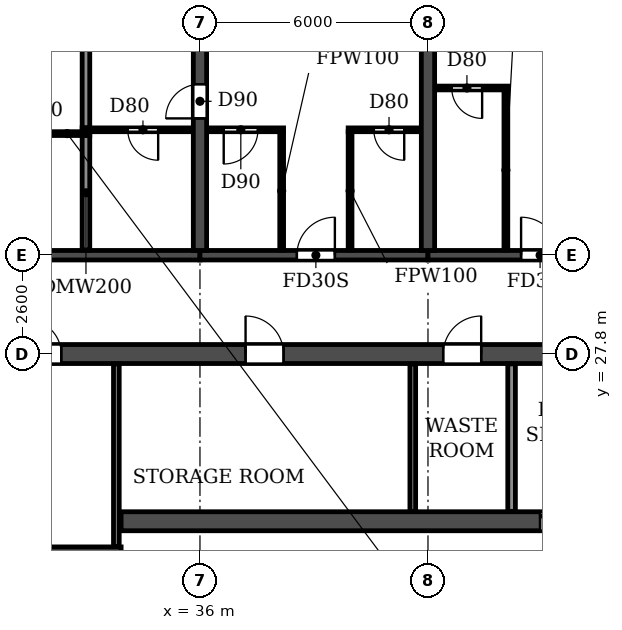
"""IFC4 building model, lengths in metres.
Left out: names, types, materials, properties, quantities, classifications, styles, units other than length and angle.
Written with IfcOpenShell. Run it as: python <this file> out.ifc"""

import sys

from ifc_helpers import new_model, si_unit, direction, frame, frame_2d, origin, place, context, subcontext, project, spatial, rectangle, extrude, element, fill, save


model = new_model("IFC4")
c1 = context("Model", 3, precision=1e-05, world=origin(), true_north=direction((0.0, 1.0)))
c2 = subcontext(c1, "Body", "Model", "MODEL_VIEW")
j1 = project(units=[si_unit("LENGTHUNIT", "METRE"), si_unit("PLANEANGLEUNIT", "RADIAN")], contexts=[c1])
p1 = place(None, origin())
s1 = spatial("IfcSite", under=j1, at=p1, CompositionType="ELEMENT")
p2 = place(p1, origin())
s2 = spatial("IfcBuilding", under=s1, at=p2, CompositionType="ELEMENT")
p3 = place(p2, frame((0.0, 0.0, 102.6)))
s3 = spatial("IfcBuildingStorey", under=s2, at=p3, CompositionType="ELEMENT", Elevation=102.6)
p4 = place(p3, frame((36.0, 30.525, 0.0), z_axis=(0.0, 0.0, 1.0), x_axis=(0.0, 1.0, 0.0)))
e1 = element("IfcWall", 1, at=p4, inside=s3, PredefinedType="SHEAR", context=c2, shape_type="SweptSolid", body=[
    extrude(rectangle(XDim=12.875, YDim=0.35, at=frame_2d((6.438, 0.0))), origin(), (0.0, 0.0, 1.0), 3.0),
])
p5 = place(p4, frame((3.475, 0.0, 0.0)))
e2 = element("IfcOpeningElement", 2, at=p5, cuts=e1, PredefinedType="OPENING", context=c2, shape_type="SweptSolid", body=[
    extrude(rectangle(XDim=0.9, YDim=2.1, at=frame_2d((0.45, 1.05))), frame((0.0, 0.185, 0.0), z_axis=(0.0, -1.0, 0.0), x_axis=(1.0, 0.0, 0.0)), (0.0, 0.0, 1.0), 0.37),
])
p6 = place(p3, frame((42.0, 30.525, 0.0), z_axis=(0.0, 0.0, 1.0), x_axis=(0.0, 1.0, 0.0)))
e3 = element("IfcWall", 3, at=p6, inside=s3, PredefinedType="SHEAR", context=c2, shape_type="SweptSolid", body=[
    extrude(rectangle(XDim=12.875, YDim=0.35, at=frame_2d((6.438, 0.0))), origin(), (0.0, 0.0, 1.0), 3.0),
])
p7 = place(p3, frame((30.0, 30.4, 0.0), z_axis=(0.0, 0.0, 1.0), x_axis=(1.0, 0.0, 0.0)))
e4 = element("IfcWall", 4, at=p7, inside=s3, PredefinedType="SHEAR", context=c2, shape_type="SweptSolid", body=[
    extrude(rectangle(XDim=6.0, YDim=0.25, at=frame_2d((3.0, 0.0))), origin(), (0.0, 0.0, 1.0), 2.4),
])
p8 = place(p3, frame((36.0, 30.4, 0.0), z_axis=(0.0, 0.0, 1.0), x_axis=(1.0, 0.0, 0.0)))
e5 = element("IfcWall", 5, at=p8, inside=s3, PredefinedType="SHEAR", context=c2, shape_type="SweptSolid", body=[
    extrude(rectangle(XDim=6.0, YDim=0.25, at=frame_2d((3.0, 0.0))), origin(), (0.0, 0.0, 1.0), 2.4),
])
p9 = place(p8, frame((2.55, 0.0, 0.0)))
e6 = element("IfcOpeningElement", 6, at=p9, cuts=e5, PredefinedType="OPENING", context=c2, shape_type="SweptSolid", body=[
    extrude(rectangle(XDim=1.0, YDim=2.1, at=frame_2d((0.5, 1.05))), frame((0.0, 0.135, 0.0), z_axis=(0.0, -1.0, 0.0), x_axis=(1.0, 0.0, 0.0)), (0.0, 0.0, 1.0), 0.27),
])
p10 = place(p3, frame((42.0, 30.4, 0.0), z_axis=(0.0, 0.0, 1.0), x_axis=(1.0, 0.0, 0.0)))
e7 = element("IfcWall", 7, at=p10, inside=s3, PredefinedType="SHEAR", context=c2, shape_type="SweptSolid", body=[
    extrude(rectangle(XDim=6.0, YDim=0.25, at=frame_2d((3.0, 0.0))), origin(), (0.0, 0.0, 1.0), 2.4),
])
p11 = place(p10, frame((2.45, 0.0, 0.0)))
e8 = element("IfcOpeningElement", 8, at=p11, cuts=e7, PredefinedType="OPENING", context=c2, shape_type="SweptSolid", body=[
    extrude(rectangle(XDim=1.0, YDim=2.1, at=frame_2d((0.5, 1.05))), frame((0.0, 0.135, 0.0), z_axis=(0.0, -1.0, 0.0), x_axis=(1.0, 0.0, 0.0)), (0.0, 0.0, 1.0), 0.27),
])
p12 = place(p3, frame((8.6, 27.8, 0.0), z_axis=(0.0, 0.0, 1.0), x_axis=(1.0, 0.0, 0.0)))
e9 = element("IfcWall", 9, at=p12, inside=s3, PredefinedType="SOLIDWALL", context=c2, shape_type="SweptSolid", body=[
    extrude(rectangle(XDim=84.8, YDim=0.5, at=frame_2d((42.4, 0.0))), origin(), (0.0, 0.0, 1.0), 3.0),
])
p13 = place(p12, frame((1.35, 0.0, 0.0)))
e10 = element("IfcOpeningElement", 10, at=p13, cuts=e9, PredefinedType="OPENING", context=c2, shape_type="SweptSolid", body=[
    extrude(rectangle(XDim=1.0, YDim=2.1, at=frame_2d((0.5, 1.05))), frame((0.0, 0.26, 0.0), z_axis=(0.0, -1.0, 0.0), x_axis=(1.0, 0.0, 0.0)), (0.0, 0.0, 1.0), 0.52),
])
p14 = place(p12, frame((6.05, 0.0, 0.0)))
e11 = element("IfcOpeningElement", 11, at=p14, cuts=e9, PredefinedType="OPENING", context=c2, shape_type="SweptSolid", body=[
    extrude(rectangle(XDim=1.0, YDim=2.1, at=frame_2d((0.5, 1.05))), frame((0.0, 0.26, 0.0), z_axis=(0.0, -1.0, 0.0), x_axis=(1.0, 0.0, 0.0)), (0.0, 0.0, 1.0), 0.52),
])
p15 = place(p12, frame((10.3, 0.0, 0.0)))
e12 = element("IfcOpeningElement", 12, at=p15, cuts=e9, PredefinedType="OPENING", context=c2, shape_type="SweptSolid", body=[
    extrude(rectangle(XDim=1.0, YDim=2.1, at=frame_2d((0.5, 1.05))), frame((0.0, 0.26, 0.0), z_axis=(0.0, -1.0, 0.0), x_axis=(1.0, 0.0, 0.0)), (0.0, 0.0, 1.0), 0.52),
])
p16 = place(p12, frame((13.65, 0.0, 0.0)))
e13 = element("IfcOpeningElement", 13, at=p16, cuts=e9, PredefinedType="OPENING", context=c2, shape_type="SweptSolid", body=[
    extrude(rectangle(XDim=0.9, YDim=2.1, at=frame_2d((0.45, 1.05))), frame((0.0, 0.26, 0.0), z_axis=(0.0, -1.0, 0.0), x_axis=(1.0, 0.0, 0.0)), (0.0, 0.0, 1.0), 0.52),
])
p17 = place(p12, frame((22.85, 0.0, 0.0)))
e14 = element("IfcOpeningElement", 14, at=p17, cuts=e9, PredefinedType="OPENING", context=c2, shape_type="SweptSolid", body=[
    extrude(rectangle(XDim=0.9, YDim=2.1, at=frame_2d((0.45, 1.05))), frame((0.0, 0.26, 0.0), z_axis=(0.0, -1.0, 0.0), x_axis=(1.0, 0.0, 0.0)), (0.0, 0.0, 1.0), 0.52),
])
p18 = place(p12, frame((28.6, 0.0, 0.0)))
e15 = element("IfcOpeningElement", 15, at=p18, cuts=e9, PredefinedType="OPENING", context=c2, shape_type="SweptSolid", body=[
    extrude(rectangle(XDim=1.0, YDim=2.1, at=frame_2d((0.5, 1.05))), frame((0.0, 0.26, 0.0), z_axis=(0.0, -1.0, 0.0), x_axis=(1.0, 0.0, 0.0)), (0.0, 0.0, 1.0), 0.52),
])
p19 = place(p12, frame((33.8, 0.0, 0.0)))
e16 = element("IfcOpeningElement", 16, at=p19, cuts=e9, PredefinedType="OPENING", context=c2, shape_type="SweptSolid", body=[
    extrude(rectangle(XDim=1.0, YDim=2.1, at=frame_2d((0.5, 1.05))), frame((0.0, 0.26, 0.0), z_axis=(0.0, -1.0, 0.0), x_axis=(1.0, 0.0, 0.0)), (0.0, 0.0, 1.0), 0.52),
])
p20 = place(p12, frame((39.0, 0.0, 0.0)))
e17 = element("IfcOpeningElement", 17, at=p20, cuts=e9, PredefinedType="OPENING", context=c2, shape_type="SweptSolid", body=[
    extrude(rectangle(XDim=1.0, YDim=2.1, at=frame_2d((0.5, 1.05))), frame((0.0, 0.26, 0.0), z_axis=(0.0, -1.0, 0.0), x_axis=(1.0, 0.0, 0.0)), (0.0, 0.0, 1.0), 0.52),
])
p21 = place(p12, frame((41.9, 0.0, 0.0)))
e18 = element("IfcOpeningElement", 18, at=p21, cuts=e9, PredefinedType="OPENING", context=c2, shape_type="SweptSolid", body=[
    extrude(rectangle(XDim=1.0, YDim=2.1, at=frame_2d((0.5, 1.05))), frame((0.0, 0.26, 0.0), z_axis=(0.0, -1.0, 0.0), x_axis=(1.0, 0.0, 0.0)), (0.0, 0.0, 1.0), 0.52),
])
p22 = place(p12, frame((44.8, 0.0, 0.0)))
e19 = element("IfcOpeningElement", 19, at=p22, cuts=e9, PredefinedType="OPENING", context=c2, shape_type="SweptSolid", body=[
    extrude(rectangle(XDim=1.0, YDim=2.1, at=frame_2d((0.5, 1.05))), frame((0.0, 0.26, 0.0), z_axis=(0.0, -1.0, 0.0), x_axis=(1.0, 0.0, 0.0)), (0.0, 0.0, 1.0), 0.52),
])
p23 = place(p12, frame((48.7, 0.0, 0.0)))
e20 = element("IfcOpeningElement", 20, at=p23, cuts=e9, PredefinedType="OPENING", context=c2, shape_type="SweptSolid", body=[
    extrude(rectangle(XDim=1.0, YDim=2.1, at=frame_2d((0.5, 1.05))), frame((0.0, 0.26, 0.0), z_axis=(0.0, -1.0, 0.0), x_axis=(1.0, 0.0, 0.0)), (0.0, 0.0, 1.0), 0.52),
])
p24 = place(p12, frame((55.2, 0.0, 0.0)))
e21 = element("IfcOpeningElement", 21, at=p24, cuts=e9, PredefinedType="OPENING", context=c2, shape_type="SweptSolid", body=[
    extrude(rectangle(XDim=1.0, YDim=2.1, at=frame_2d((0.5, 1.05))), frame((0.0, 0.26, 0.0), z_axis=(0.0, -1.0, 0.0), x_axis=(1.0, 0.0, 0.0)), (0.0, 0.0, 1.0), 0.52),
])
p25 = place(p12, frame((61.05, 0.0, 0.0)))
e22 = element("IfcOpeningElement", 22, at=p25, cuts=e9, PredefinedType="OPENING", context=c2, shape_type="SweptSolid", body=[
    extrude(rectangle(XDim=0.9, YDim=2.1, at=frame_2d((0.45, 1.05))), frame((0.0, 0.26, 0.0), z_axis=(0.0, -1.0, 0.0), x_axis=(1.0, 0.0, 0.0)), (0.0, 0.0, 1.0), 0.52),
])
p26 = place(p12, frame((70.25, 0.0, 0.0)))
e23 = element("IfcOpeningElement", 23, at=p26, cuts=e9, PredefinedType="OPENING", context=c2, shape_type="SweptSolid", body=[
    extrude(rectangle(XDim=0.9, YDim=2.1, at=frame_2d((0.45, 1.05))), frame((0.0, 0.26, 0.0), z_axis=(0.0, -1.0, 0.0), x_axis=(1.0, 0.0, 0.0)), (0.0, 0.0, 1.0), 0.52),
])
p27 = place(p12, frame((73.5, 0.0, 0.0)))
e24 = element("IfcOpeningElement", 24, at=p27, cuts=e9, PredefinedType="OPENING", context=c2, shape_type="SweptSolid", body=[
    extrude(rectangle(XDim=1.0, YDim=2.1, at=frame_2d((0.5, 1.05))), frame((0.0, 0.26, 0.0), z_axis=(0.0, -1.0, 0.0), x_axis=(1.0, 0.0, 0.0)), (0.0, 0.0, 1.0), 0.52),
])
p28 = place(p12, frame((77.95, 0.0, 0.0)))
e25 = element("IfcOpeningElement", 25, at=p28, cuts=e9, PredefinedType="OPENING", context=c2, shape_type="SweptSolid", body=[
    extrude(rectangle(XDim=1.5, YDim=2.1, at=frame_2d((0.75, 1.05))), frame((0.0, 0.26, 0.0), z_axis=(0.0, -1.0, 0.0), x_axis=(1.0, 0.0, 0.0)), (0.0, 0.0, 1.0), 0.52),
])
p29 = place(p12, frame((82.9, 0.0, 0.0)))
e26 = element("IfcOpeningElement", 26, at=p29, cuts=e9, PredefinedType="OPENING", context=c2, shape_type="SweptSolid", body=[
    extrude(rectangle(XDim=1.0, YDim=2.1, at=frame_2d((0.5, 1.05))), frame((0.0, 0.26, 0.0), z_axis=(0.0, -1.0, 0.0), x_axis=(1.0, 0.0, 0.0)), (0.0, 0.0, 1.0), 0.52),
])
p30 = place(p3, frame((33.925, 23.4, 0.0), z_axis=(0.0, 0.0, 1.0), x_axis=(1.0, 0.0, 0.0)))
e27 = element("IfcWall", 27, at=p30, inside=s3, PredefinedType="SOLIDWALL", context=c2, shape_type="SweptSolid", body=[
    extrude(rectangle(XDim=34.15, YDim=0.5, at=frame_2d((17.075, 0.0))), origin(), (0.0, 0.0, 1.0), 3.0),
])
p31 = place(p30, frame((16.175, 0.0, 0.0)))
e28 = element("IfcOpeningElement", 28, at=p31, cuts=e27, PredefinedType="OPENING", context=c2, shape_type="SweptSolid", body=[
    extrude(rectangle(XDim=1.8, YDim=2.1, at=frame_2d((0.9, 1.05))), frame((0.0, 0.26, 0.0), z_axis=(0.0, -1.0, 0.0), x_axis=(1.0, 0.0, 0.0)), (0.0, 0.0, 1.0), 0.52),
])
p32 = place(p30, frame((11.025, 0.0, 0.0)))
e29 = element("IfcOpeningElement", 29, at=p32, cuts=e27, PredefinedType="OPENING", context=c2, shape_type="SweptSolid", body=[
    extrude(rectangle(XDim=1.1, YDim=2.1, at=frame_2d((0.55, 1.05))), frame((0.0, 0.26, 0.0), z_axis=(0.0, -1.0, 0.0), x_axis=(1.0, 0.0, 0.0)), (0.0, 0.0, 1.0), 0.52),
])
p33 = place(p3, frame((29.875, 22.6, 0.0), z_axis=(0.0, 0.0, 1.0), x_axis=(1.0, 0.0, 0.0)))
e30 = element("IfcWall", 30, at=p33, inside=s3, PredefinedType="SOLIDWALL", context=c2, shape_type="SweptSolid", body=[
    extrude(rectangle(XDim=4.05, YDim=0.25, at=frame_2d((2.025, 0.0))), origin(), (0.0, 0.0, 1.0), 3.0),
])
p34 = place(p3, frame((33.0, 30.535, 0.0), z_axis=(0.0, 0.0, 1.0), x_axis=(0.0, 1.0, 0.0)))
e31 = element("IfcWall", 31, at=p34, inside=s3, PredefinedType="PARTITIONING", context=c2, shape_type="SweptSolid", body=[
    extrude(rectangle(XDim=3.015, YDim=0.2, at=frame_2d((1.508, 0.0))), origin(), (0.0, 0.0, 1.0), 3.0),
])
p35 = place(p3, frame((33.0, 33.75, 0.0), z_axis=(0.0, 0.0, 1.0), x_axis=(0.0, 1.0, 0.0)))
e32 = element("IfcWall", 32, at=p35, inside=s3, PredefinedType="PARTITIONING", context=c2, shape_type="SweptSolid", body=[
    extrude(rectangle(XDim=9.79, YDim=0.2, at=frame_2d((4.895, 0.0))), origin(), (0.0, 0.0, 1.0), 3.0),
])
p36 = place(p3, frame((30.185, 33.6, 0.0), z_axis=(0.0, 0.0, 1.0), x_axis=(1.0, 0.0, 0.0)))
e33 = element("IfcWall", 33, at=p36, inside=s3, PredefinedType="PARTITIONING", context=c2, shape_type="SweptSolid", body=[
    extrude(rectangle(XDim=2.915, YDim=0.1, at=frame_2d((1.458, 0.0))), origin(), (0.0, 0.0, 1.0), 3.0),
])
p37 = place(p36, frame((0.915, 0.0, 0.0)))
e34 = element("IfcOpeningElement", 34, at=p37, cuts=e33, PredefinedType="OPENING", context=c2, shape_type="SweptSolid", body=[
    extrude(rectangle(XDim=0.8, YDim=2.1, at=frame_2d((0.4, 1.05))), frame((0.0, 0.06, 0.0), z_axis=(0.0, -1.0, 0.0), x_axis=(1.0, 0.0, 0.0)), (0.0, 0.0, 1.0), 0.12),
])
p38 = place(p3, frame((32.9, 33.7, 0.0), z_axis=(0.0, 0.0, 1.0), x_axis=(1.0, 0.0, 0.0)))
e35 = element("IfcWall", 35, at=p38, inside=s3, PredefinedType="PARTITIONING", context=c2, shape_type="SweptSolid", body=[
    extrude(rectangle(XDim=2.915, YDim=0.1, at=frame_2d((1.458, 0.0))), origin(), (0.0, 0.0, 1.0), 3.0),
])
p39 = place(p38, frame((1.2, 0.0, 0.0)))
e36 = element("IfcOpeningElement", 36, at=p39, cuts=e35, PredefinedType="OPENING", context=c2, shape_type="SweptSolid", body=[
    extrude(rectangle(XDim=0.8, YDim=2.1, at=frame_2d((0.4, 1.05))), frame((0.0, 0.06, 0.0), z_axis=(0.0, -1.0, 0.0), x_axis=(1.0, 0.0, 0.0)), (0.0, 0.0, 1.0), 0.12),
])
p40 = place(p3, frame((36.185, 33.7, 0.0), z_axis=(0.0, 0.0, 1.0), x_axis=(1.0, 0.0, 0.0)))
e37 = element("IfcWall", 37, at=p40, inside=s3, PredefinedType="PARTITIONING", context=c2, shape_type="SweptSolid", body=[
    extrude(rectangle(XDim=2.015, YDim=0.1, at=frame_2d((1.007, 0.0))), origin(), (0.0, 0.0, 1.0), 3.0),
])
p41 = place(p40, frame((0.44, 0.0, 0.0)))
e38 = element("IfcOpeningElement", 38, at=p41, cuts=e37, PredefinedType="OPENING", context=c2, shape_type="SweptSolid", body=[
    extrude(rectangle(XDim=0.9, YDim=2.1, at=frame_2d((0.45, 1.05))), frame((0.0, 0.06, 0.0), z_axis=(0.0, -1.0, 0.0), x_axis=(1.0, 0.0, 0.0)), (0.0, 0.0, 1.0), 0.12),
])
p42 = place(p3, frame((39.9, 33.7, 0.0), z_axis=(0.0, 0.0, 1.0), x_axis=(1.0, 0.0, 0.0)))
e39 = element("IfcWall", 39, at=p42, inside=s3, PredefinedType="PARTITIONING", context=c2, shape_type="SweptSolid", body=[
    extrude(rectangle(XDim=1.915, YDim=0.1, at=frame_2d((0.958, 0.0))), origin(), (0.0, 0.0, 1.0), 3.0),
])
p43 = place(p42, frame((0.675, 0.0, 0.0)))
e40 = element("IfcOpeningElement", 40, at=p43, cuts=e39, PredefinedType="OPENING", context=c2, shape_type="SweptSolid", body=[
    extrude(rectangle(XDim=0.8, YDim=2.1, at=frame_2d((0.4, 1.05))), frame((0.0, 0.06, 0.0), z_axis=(0.0, -1.0, 0.0), x_axis=(1.0, 0.0, 0.0)), (0.0, 0.0, 1.0), 0.12),
])
p44 = place(p3, frame((42.185, 34.8, 0.0), z_axis=(0.0, 0.0, 1.0), x_axis=(1.0, 0.0, 0.0)))
e41 = element("IfcWall", 41, at=p44, inside=s3, PredefinedType="PARTITIONING", context=c2, shape_type="SweptSolid", body=[
    extrude(rectangle(XDim=1.915, YDim=0.1, at=frame_2d((0.958, 0.0))), origin(), (0.0, 0.0, 1.0), 3.0),
])
p45 = place(p44, frame((0.44, 0.0, 0.0)))
e42 = element("IfcOpeningElement", 42, at=p45, cuts=e41, PredefinedType="OPENING", context=c2, shape_type="SweptSolid", body=[
    extrude(rectangle(XDim=0.8, YDim=2.1, at=frame_2d((0.4, 1.05))), frame((0.0, 0.06, 0.0), z_axis=(0.0, -1.0, 0.0), x_axis=(1.0, 0.0, 0.0)), (0.0, 0.0, 1.0), 0.12),
])
for number, where, z_axis, x_axis in (
    (43, (38.15, 30.535, 0.0), (0.0, 0.0, 1.0), (0.0, 1.0, 0.0)),
    (44, (39.95, 30.535, 0.0), (0.0, 0.0, 1.0), (0.0, 1.0, 0.0)),
):
    element("IfcWall", number, at=place(p3, frame(where, z_axis=z_axis, x_axis=x_axis)), inside=s3, PredefinedType="PARTITIONING", context=c2, shape_type="SweptSolid", body=[
        extrude(rectangle(XDim=3.115, YDim=0.1, at=frame_2d((1.558, 0.0))), origin(), (0.0, 0.0, 1.0), 3.0),
    ])
p46 = place(p3, frame((44.05, 30.535, 0.0), z_axis=(0.0, 0.0, 1.0), x_axis=(0.0, 1.0, 0.0)))
e45 = element("IfcWall", 45, at=p46, inside=s3, PredefinedType="PARTITIONING", context=c2, shape_type="SweptSolid", body=[
    extrude(rectangle(XDim=4.215, YDim=0.1, at=frame_2d((2.107, 0.0))), origin(), (0.0, 0.0, 1.0), 3.0),
])
p47 = place(p3, frame((41.6, 23.66, 0.0), z_axis=(0.0, 0.0, 1.0), x_axis=(0.0, 1.0, 0.0)))
e46 = element("IfcWall", 46, at=p47, inside=s3, PredefinedType="PARTITIONING", context=c2, shape_type="SweptSolid", body=[
    extrude(rectangle(XDim=3.88, YDim=0.15, at=frame_2d((1.94, 0.0))), origin(), (0.0, 0.0, 1.0), 3.0),
])
p48 = place(p3, frame((33.8, 22.735, 0.0), z_axis=(0.0, 0.0, 1.0), x_axis=(0.0, 1.0, 0.0)))
e47 = element("IfcWall", 47, at=p48, inside=s3, PredefinedType="PARTITIONING", context=c2, shape_type="SweptSolid", body=[
    extrude(rectangle(XDim=4.805, YDim=0.15, at=frame_2d((2.402, 0.0))), origin(), (0.0, 0.0, 1.0), 3.0),
])
p49 = place(p3, frame((44.2, 23.66, 0.0), z_axis=(0.0, 0.0, 1.0), x_axis=(0.0, 1.0, 0.0)))
e48 = element("IfcWall", 48, at=p49, inside=s3, PredefinedType="PARTITIONING", context=c2, shape_type="SweptSolid", body=[
    extrude(rectangle(XDim=3.88, YDim=0.2, at=frame_2d((1.94, 0.0))), origin(), (0.0, 0.0, 1.0), 3.0),
])
p50 = place(p17, origin())
e49 = element("IfcDoor", 49, at=p50, inside=s3, OperationType="SINGLE_SWING_LEFT", PredefinedType="DOOR", context=c2, shape_type="SweptSolid", body=[
    extrude(rectangle(XDim=0.9, YDim=2.1, at=frame_2d((0.45, 1.05))), frame((0.0, 0.025, 0.0), z_axis=(0.0, -1.0, 0.0), x_axis=(1.0, 0.0, 0.0)), (0.0, 0.0, 1.0), 0.05),
])
fill(e14, e49)
p51 = place(p18, origin())
e50 = element("IfcDoor", 50, at=p51, inside=s3, OperationType="SINGLE_SWING_LEFT", PredefinedType="DOOR", context=c2, shape_type="SweptSolid", body=[
    extrude(rectangle(XDim=1.0, YDim=2.1, at=frame_2d((0.5, 1.05))), frame((0.0, 0.025, 0.0), z_axis=(0.0, -1.0, 0.0), x_axis=(1.0, 0.0, 0.0)), (0.0, 0.0, 1.0), 0.05),
])
fill(e15, e50)
p52 = place(p19, origin())
e51 = element("IfcDoor", 51, at=p52, inside=s3, OperationType="SINGLE_SWING_RIGHT", PredefinedType="DOOR", context=c2, shape_type="SweptSolid", body=[
    extrude(rectangle(XDim=1.0, YDim=2.1, at=frame_2d((0.5, 1.05))), frame((0.0, 0.025, 0.0), z_axis=(0.0, -1.0, 0.0), x_axis=(1.0, 0.0, 0.0)), (0.0, 0.0, 1.0), 0.05),
])
fill(e16, e51)
p53 = place(p39, frame((0.8, 0.0, 0.0), z_axis=(0.0, 0.0, 1.0), x_axis=(-1.0, 0.0, 0.0)))
e52 = element("IfcDoor", 52, at=p53, inside=s3, OperationType="SINGLE_SWING_LEFT", PredefinedType="DOOR", context=c2, shape_type="SweptSolid", body=[
    extrude(rectangle(XDim=0.8, YDim=2.1, at=frame_2d((0.4, 1.05))), frame((0.0, 0.025, 0.0), z_axis=(0.0, -1.0, 0.0), x_axis=(1.0, 0.0, 0.0)), (0.0, 0.0, 1.0), 0.05),
])
fill(e36, e52)
p54 = place(p5, origin())
e53 = element("IfcDoor", 53, at=p54, inside=s3, OperationType="SINGLE_SWING_LEFT", PredefinedType="DOOR", context=c2, shape_type="SweptSolid", body=[
    extrude(rectangle(XDim=0.9, YDim=2.1, at=frame_2d((0.45, 1.05))), frame((0.0, 0.025, 0.0), z_axis=(0.0, -1.0, 0.0), x_axis=(1.0, 0.0, 0.0)), (0.0, 0.0, 1.0), 0.05),
])
fill(e2, e53)
p55 = place(p41, frame((0.9, 0.0, 0.0), z_axis=(0.0, 0.0, 1.0), x_axis=(-1.0, 0.0, 0.0)))
e54 = element("IfcDoor", 54, at=p55, inside=s3, OperationType="SINGLE_SWING_RIGHT", PredefinedType="DOOR", context=c2, shape_type="SweptSolid", body=[
    extrude(rectangle(XDim=0.9, YDim=2.1, at=frame_2d((0.45, 1.05))), frame((0.0, 0.025, 0.0), z_axis=(0.0, -1.0, 0.0), x_axis=(1.0, 0.0, 0.0)), (0.0, 0.0, 1.0), 0.05),
])
fill(e38, e54)
p56 = place(p9, origin())
e55 = element("IfcDoor", 55, at=p56, inside=s3, OperationType="SINGLE_SWING_RIGHT", PredefinedType="DOOR", context=c2, shape_type="SweptSolid", body=[
    extrude(rectangle(XDim=1.0, YDim=2.1, at=frame_2d((0.5, 1.05))), frame((0.0, 0.025, 0.0), z_axis=(0.0, -1.0, 0.0), x_axis=(1.0, 0.0, 0.0)), (0.0, 0.0, 1.0), 0.05),
])
fill(e6, e55)
p57 = place(p43, frame((0.8, 0.0, 0.0), z_axis=(0.0, 0.0, 1.0), x_axis=(-1.0, 0.0, 0.0)))
e56 = element("IfcDoor", 56, at=p57, inside=s3, OperationType="SINGLE_SWING_LEFT", PredefinedType="DOOR", context=c2, shape_type="SweptSolid", body=[
    extrude(rectangle(XDim=0.8, YDim=2.1, at=frame_2d((0.4, 1.05))), frame((0.0, 0.025, 0.0), z_axis=(0.0, -1.0, 0.0), x_axis=(1.0, 0.0, 0.0)), (0.0, 0.0, 1.0), 0.05),
])
fill(e40, e56)
p58 = place(p45, frame((0.8, 0.0, 0.0), z_axis=(0.0, 0.0, 1.0), x_axis=(-1.0, 0.0, 0.0)))
e57 = element("IfcDoor", 57, at=p58, inside=s3, OperationType="SINGLE_SWING_LEFT", PredefinedType="DOOR", context=c2, shape_type="SweptSolid", body=[
    extrude(rectangle(XDim=0.8, YDim=2.1, at=frame_2d((0.4, 1.05))), frame((0.0, 0.025, 0.0), z_axis=(0.0, -1.0, 0.0), x_axis=(1.0, 0.0, 0.0)), (0.0, 0.0, 1.0), 0.05),
])
fill(e42, e57)
p59 = place(p11, origin())
e58 = element("IfcDoor", 58, at=p59, inside=s3, OperationType="SINGLE_SWING_LEFT", PredefinedType="DOOR", context=c2, shape_type="SweptSolid", body=[
    extrude(rectangle(XDim=1.0, YDim=2.1, at=frame_2d((0.5, 1.05))), frame((0.0, 0.025, 0.0), z_axis=(0.0, -1.0, 0.0), x_axis=(1.0, 0.0, 0.0)), (0.0, 0.0, 1.0), 0.05),
])
fill(e8, e58)
p60 = place(p32, origin())
e59 = element("IfcDoor", 59, at=p60, inside=s3, OperationType="DOUBLE_DOOR_SLIDING", PredefinedType="DOOR", context=c2, shape_type="SweptSolid", body=[
    extrude(rectangle(XDim=1.1, YDim=2.1, at=frame_2d((0.55, 1.05))), frame((0.0, 0.025, 0.0), z_axis=(0.0, -1.0, 0.0), x_axis=(1.0, 0.0, 0.0)), (0.0, 0.0, 1.0), 0.05),
])
fill(e29, e59)
save(model, sys.argv[1])
